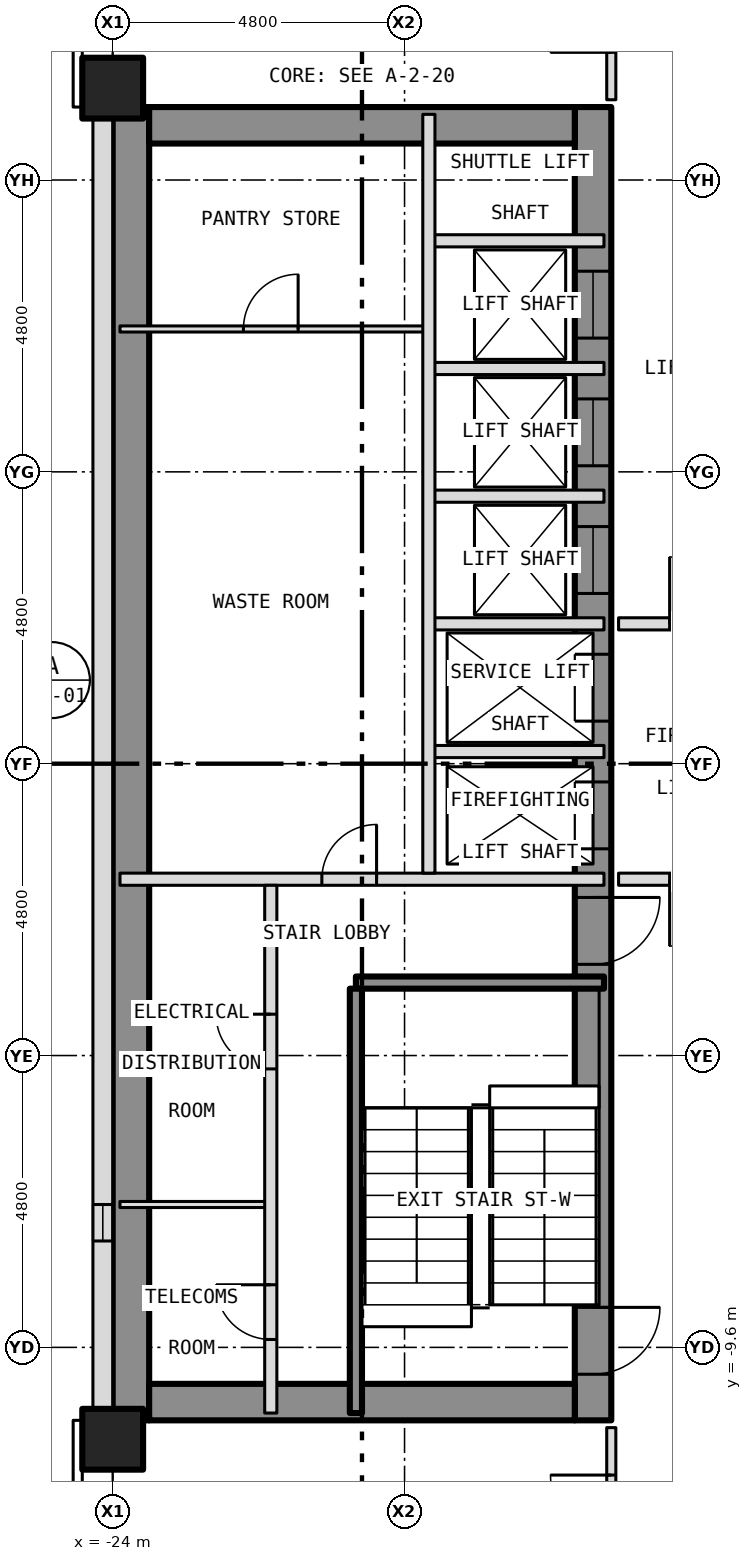
"""IFC4 building model, lengths in metres.
Left out: names, types, materials, properties, quantities, classifications, styles, units other than length and angle.
Written with IfcOpenShell. Run it as: python <this file> out.ifc"""

import sys

from ifc_helpers import new_model, si_unit, direction, frame, frame_2d, origin, origin_2d, place, context, subcontext, project, spatial, rectangle, hollow_rectangle, extrude, element, fill, save


model = new_model("IFC4")
c1 = context("Model", 3, precision=1e-05, world=origin(), true_north=direction((0.0, 1.0)))
c2 = subcontext(c1, "Body", "Model", "MODEL_VIEW")
j1 = project(units=[si_unit("LENGTHUNIT", "METRE"), si_unit("PLANEANGLEUNIT", "RADIAN")], contexts=[c1])
p1 = place(None, origin())
s1 = spatial("IfcSite", under=j1, at=p1, CompositionType="ELEMENT")
p2 = place(p1, origin())
s2 = spatial("IfcBuilding", under=s1, at=p2, CompositionType="ELEMENT")
p3 = place(p2, frame((0.0, 0.0, 74.0)))
s3 = spatial("IfcBuildingStorey", under=s2, at=p3, CompositionType="ELEMENT", Elevation=74.0)
for number, where, z_axis, x_axis in (
    (1, (-24.0, -11.111, -0.15), (0.0, 0.0, 1.0), (1.0, 0.0, 0.0)),
    (2, (-24.0, 11.111, -0.15), (0.0, 0.0, 1.0), (1.0, 0.0, 0.0)),
):
    element("IfcColumn", number, at=place(p3, frame(where, z_axis=z_axis, x_axis=x_axis)), inside=s3, PredefinedType="COLUMN", context=c2, shape_type="SweptSolid", body=[
        extrude(hollow_rectangle(XDim=1.0, YDim=1.0, WallThickness=0.06, at=origin_2d()), origin(), (0.0, 0.0, 1.0), 3.5),
    ])
p4 = place(p3, frame((-16.1, -10.8, 0.0), z_axis=(0.0, 0.0, 1.0), x_axis=(0.0, 1.0, 0.0)))
e3 = element("IfcWall", 3, at=p4, inside=s3, PredefinedType="SHEAR", context=c2, shape_type="SweptSolid", body=[
    extrude(rectangle(XDim=21.6, YDim=0.6, at=frame_2d((10.8, 0.0))), origin(), (0.0, 0.0, 1.0), 3.25),
])
p5 = place(p4, frame((9.4, 0.0, 0.0)))
e4 = element("IfcOpeningElement", 4, at=p5, cuts=e3, PredefinedType="OPENING", context=c2, shape_type="SweptSolid", body=[
    extrude(rectangle(XDim=1.1, YDim=2.1, at=frame_2d((0.55, 1.05))), frame((0.0, 0.312, 0.0), z_axis=(0.0, -1.0, 0.0), x_axis=(1.0, 0.0, 0.0)), (0.0, 0.0, 1.0), 0.624),
])
p6 = place(p4, frame((11.5, 0.0, 0.0)))
e5 = element("IfcOpeningElement", 5, at=p6, cuts=e3, PredefinedType="OPENING", context=c2, shape_type="SweptSolid", body=[
    extrude(rectangle(XDim=1.1, YDim=2.1, at=frame_2d((0.55, 1.05))), frame((0.0, 0.312, 0.0), z_axis=(0.0, -1.0, 0.0), x_axis=(1.0, 0.0, 0.0)), (0.0, 0.0, 1.0), 0.624),
])
p7 = place(p4, frame((13.6, 0.0, 0.0)))
e6 = element("IfcOpeningElement", 6, at=p7, cuts=e3, PredefinedType="OPENING", context=c2, shape_type="SweptSolid", body=[
    extrude(rectangle(XDim=1.1, YDim=2.1, at=frame_2d((0.55, 1.05))), frame((0.0, 0.312, 0.0), z_axis=(0.0, -1.0, 0.0), x_axis=(1.0, 0.0, 0.0)), (0.0, 0.0, 1.0), 0.624),
])
p8 = place(p4, frame((15.7, 0.0, 0.0)))
e7 = element("IfcOpeningElement", 7, at=p8, cuts=e3, PredefinedType="OPENING", context=c2, shape_type="SweptSolid", body=[
    extrude(rectangle(XDim=1.1, YDim=2.1, at=frame_2d((0.55, 1.05))), frame((0.0, 0.312, 0.0), z_axis=(0.0, -1.0, 0.0), x_axis=(1.0, 0.0, 0.0)), (0.0, 0.0, 1.0), 0.624),
])
p9 = place(p4, frame((17.8, 0.0, 0.0)))
e8 = element("IfcOpeningElement", 8, at=p9, cuts=e3, PredefinedType="OPENING", context=c2, shape_type="SweptSolid", body=[
    extrude(rectangle(XDim=1.1, YDim=2.1, at=frame_2d((0.55, 1.05))), frame((0.0, 0.312, 0.0), z_axis=(0.0, -1.0, 0.0), x_axis=(1.0, 0.0, 0.0)), (0.0, 0.0, 1.0), 0.624),
])
p10 = place(p4, frame((0.758, 0.0, 0.0)))
e9 = element("IfcOpeningElement", 9, at=p10, cuts=e3, PredefinedType="OPENING", context=c2, shape_type="SweptSolid", body=[
    extrude(rectangle(XDim=1.1, YDim=2.1, at=frame_2d((0.55, 1.05))), frame((0.0, 0.312, 0.0), z_axis=(0.0, -1.0, 0.0), x_axis=(1.0, 0.0, 0.0)), (0.0, 0.0, 1.0), 0.624),
])
p11 = place(p4, frame((7.5, 0.0, 0.0)))
e10 = element("IfcOpeningElement", 10, at=p11, cuts=e3, PredefinedType="OPENING", context=c2, shape_type="SweptSolid", body=[
    extrude(rectangle(XDim=1.1, YDim=2.1, at=frame_2d((0.55, 1.05))), frame((0.0, 0.312, 0.0), z_axis=(0.0, -1.0, 0.0), x_axis=(1.0, 0.0, 0.0)), (0.0, 0.0, 1.0), 0.624),
])
p12 = place(p3, frame((-23.7, -10.8, 0.0), z_axis=(0.0, 0.0, 1.0), x_axis=(0.0, 1.0, 0.0)))
e11 = element("IfcWall", 11, at=p12, inside=s3, PredefinedType="SHEAR", context=c2, shape_type="SweptSolid", body=[
    extrude(rectangle(XDim=21.6, YDim=0.6, at=frame_2d((10.8, 0.0))), origin(), (0.0, 0.0, 1.0), 3.25),
])
for number, where, z_axis, x_axis in (
    (12, (-23.4, 10.5, 0.0), (0.0, 0.0, 1.0), (1.0, 0.0, 0.0)),
    (13, (-23.4, -10.5, 0.0), (0.0, 0.0, 1.0), (1.0, 0.0, 0.0)),
):
    element("IfcWall", number, at=place(p3, frame(where, z_axis=z_axis, x_axis=x_axis)), inside=s3, PredefinedType="SHEAR", context=c2, shape_type="SweptSolid", body=[
        extrude(rectangle(XDim=7.0, YDim=0.6, at=frame_2d((3.5, 0.0))), origin(), (0.0, 0.0, 1.0), 3.25),
    ])
p13 = place(p3, frame((-24.163, 10.8, 0.0), z_axis=(0.0, 0.0, 1.0), x_axis=(0.0, -1.0, 0.0)))
e14 = element("IfcWall", 14, at=p13, inside=s3, PredefinedType="SOLIDWALL", context=c2, shape_type="SweptSolid", body=[
    extrude(rectangle(XDim=21.6, YDim=0.325, at=frame_2d((10.8, 0.0))), origin(), (0.0, 0.0, 1.0), 3.5),
])
p14 = place(p13, frame((18.05, 0.0, 1.0)))
e15 = element("IfcOpeningElement", 15, at=p14, cuts=e14, PredefinedType="OPENING", context=c2, shape_type="SweptSolid", body=[
    extrude(rectangle(XDim=0.6, YDim=1.5, at=frame_2d((0.3, 0.75))), frame((0.0, 0.175, 0.0), z_axis=(0.0, -1.0, 0.0), x_axis=(1.0, 0.0, 0.0)), (0.0, 0.0, 1.0), 0.349),
])
p15 = place(p3, frame((-23.88, -7.25, 0.0), z_axis=(0.0, 0.0, 1.0), x_axis=(1.0, 0.0, 0.0)))
e16 = element("IfcWall", 16, at=p15, inside=s3, PredefinedType="PARTITIONING", context=c2, shape_type="SweptSolid", body=[
    extrude(rectangle(XDim=2.48, YDim=0.1, at=frame_2d((1.24, 0.0))), origin(), (0.0, 0.0, 1.0), 3.25),
])
p16 = place(p3, frame((-20.0, -3.6, 0.0), z_axis=(0.0, 0.0, 1.0), x_axis=(1.0, 0.0, 0.0)))
e17 = element("IfcWall", 17, at=p16, inside=s3, PredefinedType="SHEAR", context=c2, shape_type="SweptSolid", body=[
    extrude(rectangle(XDim=4.08, YDim=0.2, at=frame_2d((2.04, 0.0))), origin(), (0.0, 0.0, 1.0), 3.25),
])
p17 = place(p3, frame((-23.88, -1.9, 0.0), z_axis=(0.0, 0.0, 1.0), x_axis=(1.0, 0.0, 0.0)))
e18 = element("IfcWall", 18, at=p17, inside=s3, PredefinedType="PARTITIONING", context=c2, shape_type="SweptSolid", body=[
    extrude(rectangle(XDim=7.96, YDim=0.2, at=frame_2d((3.98, 0.0))), origin(), (0.0, 0.0, 1.0), 3.25),
])
p18 = place(p17, frame((3.32, 0.0, 0.0)))
e19 = element("IfcOpeningElement", 19, at=p18, cuts=e18, PredefinedType="OPENING", context=c2, shape_type="SweptSolid", body=[
    extrude(rectangle(XDim=0.9, YDim=2.1, at=frame_2d((0.45, 1.05))), frame((0.0, 0.112, 0.0), z_axis=(0.0, -1.0, 0.0), x_axis=(1.0, 0.0, 0.0)), (0.0, 0.0, 1.0), 0.224),
])
p19 = place(p3, frame((-15.68, -1.9, 0.0), z_axis=(0.0, 0.0, 1.0), x_axis=(1.0, 0.0, 0.0)))
e20 = element("IfcWall", 20, at=p19, inside=s3, PredefinedType="PARTITIONING", context=c2, shape_type="SweptSolid", body=[
    extrude(rectangle(XDim=3.28, YDim=0.2, at=frame_2d((1.64, 0.0))), origin(), (0.0, 0.0, 1.0), 3.35),
])
p20 = place(p19, frame((0.84, 0.0, 0.0)))
e21 = element("IfcOpeningElement", 21, at=p20, cuts=e20, PredefinedType="OPENING", context=c2, shape_type="SweptSolid", body=[
    extrude(rectangle(XDim=1.1, YDim=2.1, at=frame_2d((0.55, 1.05))), frame((0.0, 0.112, 0.0), z_axis=(0.0, -1.0, 0.0), x_axis=(1.0, 0.0, 0.0)), (0.0, 0.0, 1.0), 0.224),
])
for number, where, z_axis, x_axis in (
    (22, (-18.8, 0.2, 0.0), (0.0, 0.0, 1.0), (1.0, 0.0, 0.0)),
    (23, (-18.8, 2.3, 0.0), (0.0, 0.0, 1.0), (1.0, 0.0, 0.0)),
):
    element("IfcWall", number, at=place(p3, frame(where, z_axis=z_axis, x_axis=x_axis)), inside=s3, PredefinedType="PARTITIONING", context=c2, shape_type="SweptSolid", body=[
        extrude(rectangle(XDim=2.88, YDim=0.2, at=frame_2d((1.44, 0.0))), origin(), (0.0, 0.0, 1.0), 3.25),
    ])
p21 = place(p3, frame((-15.68, 2.3, 0.0), z_axis=(0.0, 0.0, 1.0), x_axis=(1.0, 0.0, 0.0)))
e24 = element("IfcWall", 24, at=p21, inside=s3, PredefinedType="PARTITIONING", context=c2, shape_type="SweptSolid", body=[
    extrude(rectangle(XDim=3.28, YDim=0.2, at=frame_2d((1.64, 0.0))), origin(), (0.0, 0.0, 1.0), 3.35),
])
p22 = place(p21, frame((0.84, 0.0, 0.0)))
e25 = element("IfcOpeningElement", 25, at=p22, cuts=e24, PredefinedType="OPENING", context=c2, shape_type="SweptSolid", body=[
    extrude(rectangle(XDim=1.1, YDim=2.1, at=frame_2d((0.55, 1.05))), frame((0.0, 0.112, 0.0), z_axis=(0.0, -1.0, 0.0), x_axis=(1.0, 0.0, 0.0)), (0.0, 0.0, 1.0), 0.224),
])
for number, where, z_axis, x_axis in (
    (26, (-18.8, 4.4, 0.0), (0.0, 0.0, 1.0), (1.0, 0.0, 0.0)),
    (27, (-18.8, 6.5, 0.0), (0.0, 0.0, 1.0), (1.0, 0.0, 0.0)),
):
    element("IfcWall", number, at=place(p3, frame(where, z_axis=z_axis, x_axis=x_axis)), inside=s3, PredefinedType="PARTITIONING", context=c2, shape_type="SweptSolid", body=[
        extrude(rectangle(XDim=2.88, YDim=0.2, at=frame_2d((1.44, 0.0))), origin(), (0.0, 0.0, 1.0), 3.25),
    ])
p23 = place(p3, frame((-23.88, 7.15, 0.0), z_axis=(0.0, 0.0, 1.0), x_axis=(1.0, 0.0, 0.0)))
e28 = element("IfcWall", 28, at=p23, inside=s3, PredefinedType="PARTITIONING", context=c2, shape_type="SweptSolid", body=[
    extrude(rectangle(XDim=5.08, YDim=0.1, at=frame_2d((2.54, 0.0))), origin(), (0.0, 0.0, 1.0), 3.25),
])
p24 = place(p23, frame((2.03, 0.0, 0.0)))
e29 = element("IfcOpeningElement", 29, at=p24, cuts=e28, PredefinedType="OPENING", context=c2, shape_type="SweptSolid", body=[
    extrude(rectangle(XDim=0.9, YDim=2.1, at=frame_2d((0.45, 1.05))), frame((0.0, 0.062, 0.0), z_axis=(0.0, -1.0, 0.0), x_axis=(1.0, 0.0, 0.0)), (0.0, 0.0, 1.0), 0.124),
])
p25 = place(p3, frame((-18.8, 8.6, 0.0), z_axis=(0.0, 0.0, 1.0), x_axis=(1.0, 0.0, 0.0)))
e30 = element("IfcWall", 30, at=p25, inside=s3, PredefinedType="PARTITIONING", context=c2, shape_type="SweptSolid", body=[
    extrude(rectangle(XDim=2.88, YDim=0.2, at=frame_2d((1.44, 0.0))), origin(), (0.0, 0.0, 1.0), 3.25),
])
p26 = place(p3, frame((-21.4, -10.68, 0.0), z_axis=(0.0, 0.0, 1.0), x_axis=(0.0, 1.0, 0.0)))
e31 = element("IfcWall", 31, at=p26, inside=s3, PredefinedType="PARTITIONING", context=c2, shape_type="SweptSolid", body=[
    extrude(rectangle(XDim=8.68, YDim=0.2, at=frame_2d((4.34, 0.0))), origin(), (0.0, 0.0, 1.0), 3.25),
])
p27 = place(p26, frame((1.21, 0.0, 0.0)))
e32 = element("IfcOpeningElement", 32, at=p27, cuts=e31, PredefinedType="OPENING", context=c2, shape_type="SweptSolid", body=[
    extrude(rectangle(XDim=0.9, YDim=2.1, at=frame_2d((0.45, 1.05))), frame((0.0, 0.112, 0.0), z_axis=(0.0, -1.0, 0.0), x_axis=(1.0, 0.0, 0.0)), (0.0, 0.0, 1.0), 0.224),
])
p28 = place(p26, frame((5.66, 0.0, 0.0)))
e33 = element("IfcOpeningElement", 33, at=p28, cuts=e31, PredefinedType="OPENING", context=c2, shape_type="SweptSolid", body=[
    extrude(rectangle(XDim=0.9, YDim=2.1, at=frame_2d((0.45, 1.05))), frame((0.0, 0.112, 0.0), z_axis=(0.0, -1.0, 0.0), x_axis=(1.0, 0.0, 0.0)), (0.0, 0.0, 1.0), 0.224),
])
p29 = place(p3, frame((-20.0, -10.68, 0.0), z_axis=(0.0, 0.0, 1.0), x_axis=(0.0, 1.0, 0.0)))
e34 = element("IfcWall", 34, at=p29, inside=s3, PredefinedType="SHEAR", context=c2, shape_type="SweptSolid", body=[
    extrude(rectangle(XDim=6.98, YDim=0.2, at=frame_2d((3.49, 0.0))), origin(), (0.0, 0.0, 1.0), 3.25),
])
p30 = place(p3, frame((-18.8, -1.8, 0.0), z_axis=(0.0, 0.0, 1.0), x_axis=(0.0, 1.0, 0.0)))
e35 = element("IfcWall", 35, at=p30, inside=s3, PredefinedType="PARTITIONING", context=c2, shape_type="SweptSolid", body=[
    extrude(rectangle(XDim=12.48, YDim=0.2, at=frame_2d((6.24, 0.0))), origin(), (0.0, 0.0, 1.0), 3.25),
])
p31 = place(p3, frame((-15.8, -15.725, 0.0), z_axis=(0.0, 0.0, 1.0), x_axis=(0.0, 1.0, 0.0)))
e36 = element("IfcWall", 36, at=p31, inside=s3, PredefinedType="PARTITIONING", context=c2, shape_type="SweptSolid", body=[
    extrude(rectangle(XDim=4.805, YDim=0.15, at=frame_2d((2.403, 0.0))), origin(), (0.0, 0.0, 1.0), 3.35),
])
p32 = place(p31, frame((3.025, 0.0, 0.0)))
e37 = element("IfcOpeningElement", 37, at=p32, cuts=e36, PredefinedType="OPENING", context=c2, shape_type="SweptSolid", body=[
    extrude(rectangle(XDim=1.0, YDim=2.1, at=frame_2d((0.5, 1.05))), frame((0.0, 0.087, 0.0), z_axis=(0.0, -1.0, 0.0), x_axis=(1.0, 0.0, 0.0)), (0.0, 0.0, 1.0), 0.174),
])
p33 = place(p3, frame((-15.8, 10.92, 0.0), z_axis=(0.0, 0.0, 1.0), x_axis=(0.0, 1.0, 0.0)))
e38 = element("IfcWall", 38, at=p33, inside=s3, PredefinedType="PARTITIONING", context=c2, shape_type="SweptSolid", body=[
    extrude(rectangle(XDim=4.805, YDim=0.15, at=frame_2d((2.403, 0.0))), origin(), (0.0, 0.0, 1.0), 3.35),
])
p34 = place(p33, frame((0.78, 0.0, 0.0)))
e39 = element("IfcOpeningElement", 39, at=p34, cuts=e38, PredefinedType="OPENING", context=c2, shape_type="SweptSolid", body=[
    extrude(rectangle(XDim=1.0, YDim=2.1, at=frame_2d((0.5, 1.05))), frame((0.0, 0.087, 0.0), z_axis=(0.0, -1.0, 0.0), x_axis=(1.0, 0.0, 0.0)), (0.0, 0.0, 1.0), 0.174),
])
p35 = place(p14, origin())
e40 = element("IfcWindow", 40, at=p35, inside=s3, PartitioningType="SINGLE_PANEL", PredefinedType="WINDOW", context=c2, shape_type="SweptSolid", body=[
    extrude(rectangle(XDim=0.6, YDim=1.5, at=frame_2d((0.3, 0.75))), frame((0.0, -0.073, 0.0), z_axis=(0.0, -1.0, 0.0), x_axis=(1.0, 0.0, 0.0)), (0.0, 0.0, 1.0), 0.06),
])
fill(e15, e40)
p36 = place(p5, origin())
e41 = element("IfcDoor", 41, at=p36, inside=s3, OperationType="SLIDING_TO_LEFT", PredefinedType="DOOR", context=c2, shape_type="SweptSolid", body=[
    extrude(rectangle(XDim=1.1, YDim=2.1, at=frame_2d((0.55, 1.05))), frame((0.0, 0.025, 0.0), z_axis=(0.0, -1.0, 0.0), x_axis=(1.0, 0.0, 0.0)), (0.0, 0.0, 1.0), 0.05),
])
fill(e4, e41)
p37 = place(p6, origin())
e42 = element("IfcDoor", 42, at=p37, inside=s3, OperationType="SLIDING_TO_LEFT", PredefinedType="DOOR", context=c2, shape_type="SweptSolid", body=[
    extrude(rectangle(XDim=1.1, YDim=2.1, at=frame_2d((0.55, 1.05))), frame((0.0, 0.025, 0.0), z_axis=(0.0, -1.0, 0.0), x_axis=(1.0, 0.0, 0.0)), (0.0, 0.0, 1.0), 0.05),
])
fill(e5, e42)
p38 = place(p7, origin())
e43 = element("IfcDoor", 43, at=p38, inside=s3, OperationType="SLIDING_TO_LEFT", PredefinedType="DOOR", context=c2, shape_type="SweptSolid", body=[
    extrude(rectangle(XDim=1.1, YDim=2.1, at=frame_2d((0.55, 1.05))), frame((0.0, 0.025, 0.0), z_axis=(0.0, -1.0, 0.0), x_axis=(1.0, 0.0, 0.0)), (0.0, 0.0, 1.0), 0.05),
])
fill(e6, e43)
p39 = place(p8, origin())
e44 = element("IfcDoor", 44, at=p39, inside=s3, OperationType="SLIDING_TO_LEFT", PredefinedType="DOOR", context=c2, shape_type="SweptSolid", body=[
    extrude(rectangle(XDim=1.1, YDim=2.1, at=frame_2d((0.55, 1.05))), frame((0.0, 0.025, 0.0), z_axis=(0.0, -1.0, 0.0), x_axis=(1.0, 0.0, 0.0)), (0.0, 0.0, 1.0), 0.05),
])
fill(e7, e44)
p40 = place(p9, origin())
e45 = element("IfcDoor", 45, at=p40, inside=s3, OperationType="SLIDING_TO_LEFT", PredefinedType="DOOR", context=c2, shape_type="SweptSolid", body=[
    extrude(rectangle(XDim=1.1, YDim=2.1, at=frame_2d((0.55, 1.05))), frame((0.0, 0.025, 0.0), z_axis=(0.0, -1.0, 0.0), x_axis=(1.0, 0.0, 0.0)), (0.0, 0.0, 1.0), 0.05),
])
fill(e8, e45)
p41 = place(p10, origin())
e46 = element("IfcDoor", 46, at=p41, inside=s3, OperationType="SINGLE_SWING_RIGHT", PredefinedType="DOOR", context=c2, shape_type="SweptSolid", body=[
    extrude(rectangle(XDim=1.1, YDim=2.1, at=frame_2d((0.55, 1.05))), frame((0.0, 0.025, 0.0), z_axis=(0.0, -1.0, 0.0), x_axis=(1.0, 0.0, 0.0)), (0.0, 0.0, 1.0), 0.05),
])
fill(e9, e46)
p42 = place(p11, origin())
e47 = element("IfcDoor", 47, at=p42, inside=s3, OperationType="SINGLE_SWING_RIGHT", PredefinedType="DOOR", context=c2, shape_type="SweptSolid", body=[
    extrude(rectangle(XDim=1.1, YDim=2.1, at=frame_2d((0.55, 1.05))), frame((0.0, 0.025, 0.0), z_axis=(0.0, -1.0, 0.0), x_axis=(1.0, 0.0, 0.0)), (0.0, 0.0, 1.0), 0.05),
])
fill(e10, e47)
p43 = place(p27, origin())
e48 = element("IfcDoor", 48, at=p43, inside=s3, OperationType="SINGLE_SWING_RIGHT", PredefinedType="DOOR", context=c2, shape_type="SweptSolid", body=[
    extrude(rectangle(XDim=0.9, YDim=2.1, at=frame_2d((0.45, 1.05))), frame((0.0, 0.025, 0.0), z_axis=(0.0, -1.0, 0.0), x_axis=(1.0, 0.0, 0.0)), (0.0, 0.0, 1.0), 0.05),
])
fill(e32, e48)
p44 = place(p28, origin())
e49 = element("IfcDoor", 49, at=p44, inside=s3, OperationType="SINGLE_SWING_RIGHT", PredefinedType="DOOR", context=c2, shape_type="SweptSolid", body=[
    extrude(rectangle(XDim=0.9, YDim=2.1, at=frame_2d((0.45, 1.05))), frame((0.0, 0.025, 0.0), z_axis=(0.0, -1.0, 0.0), x_axis=(1.0, 0.0, 0.0)), (0.0, 0.0, 1.0), 0.05),
])
fill(e33, e49)
p45 = place(p18, origin())
e50 = element("IfcDoor", 50, at=p45, inside=s3, OperationType="SINGLE_SWING_RIGHT", PredefinedType="DOOR", context=c2, shape_type="SweptSolid", body=[
    extrude(rectangle(XDim=0.9, YDim=2.1, at=frame_2d((0.45, 1.05))), frame((0.0, 0.025, 0.0), z_axis=(0.0, -1.0, 0.0), x_axis=(1.0, 0.0, 0.0)), (0.0, 0.0, 1.0), 0.05),
])
fill(e19, e50)
p46 = place(p24, origin())
e51 = element("IfcDoor", 51, at=p46, inside=s3, OperationType="SINGLE_SWING_RIGHT", PredefinedType="DOOR", context=c2, shape_type="SweptSolid", body=[
    extrude(rectangle(XDim=0.9, YDim=2.1, at=frame_2d((0.45, 1.05))), frame((0.0, 0.025, 0.0), z_axis=(0.0, -1.0, 0.0), x_axis=(1.0, 0.0, 0.0)), (0.0, 0.0, 1.0), 0.05),
])
fill(e29, e51)
p47 = place(p20, origin())
e52 = element("IfcDoor", 52, at=p47, inside=s3, OperationType="SINGLE_SWING_LEFT", PredefinedType="DOOR", context=c2, shape_type="SweptSolid", body=[
    extrude(rectangle(XDim=1.1, YDim=2.1, at=frame_2d((0.55, 1.05))), frame((0.0, 0.025, 0.0), z_axis=(0.0, -1.0, 0.0), x_axis=(1.0, 0.0, 0.0)), (0.0, 0.0, 1.0), 0.05),
])
fill(e21, e52)
p48 = place(p22, origin())
e53 = element("IfcDoor", 53, at=p48, inside=s3, OperationType="SINGLE_SWING_LEFT", PredefinedType="DOOR", context=c2, shape_type="SweptSolid", body=[
    extrude(rectangle(XDim=1.1, YDim=2.1, at=frame_2d((0.55, 1.05))), frame((0.0, 0.025, 0.0), z_axis=(0.0, -1.0, 0.0), x_axis=(1.0, 0.0, 0.0)), (0.0, 0.0, 1.0), 0.05),
])
fill(e25, e53)
p49 = place(p32, origin())
e54 = element("IfcDoor", 54, at=p49, inside=s3, OperationType="SINGLE_SWING_RIGHT", PredefinedType="DOOR", context=c2, shape_type="SweptSolid", body=[
    extrude(rectangle(XDim=1.0, YDim=2.1, at=frame_2d((0.5, 1.05))), frame((0.0, 0.025, 0.0), z_axis=(0.0, -1.0, 0.0), x_axis=(1.0, 0.0, 0.0)), (0.0, 0.0, 1.0), 0.05),
])
fill(e37, e54)
save(model, sys.argv[1])
